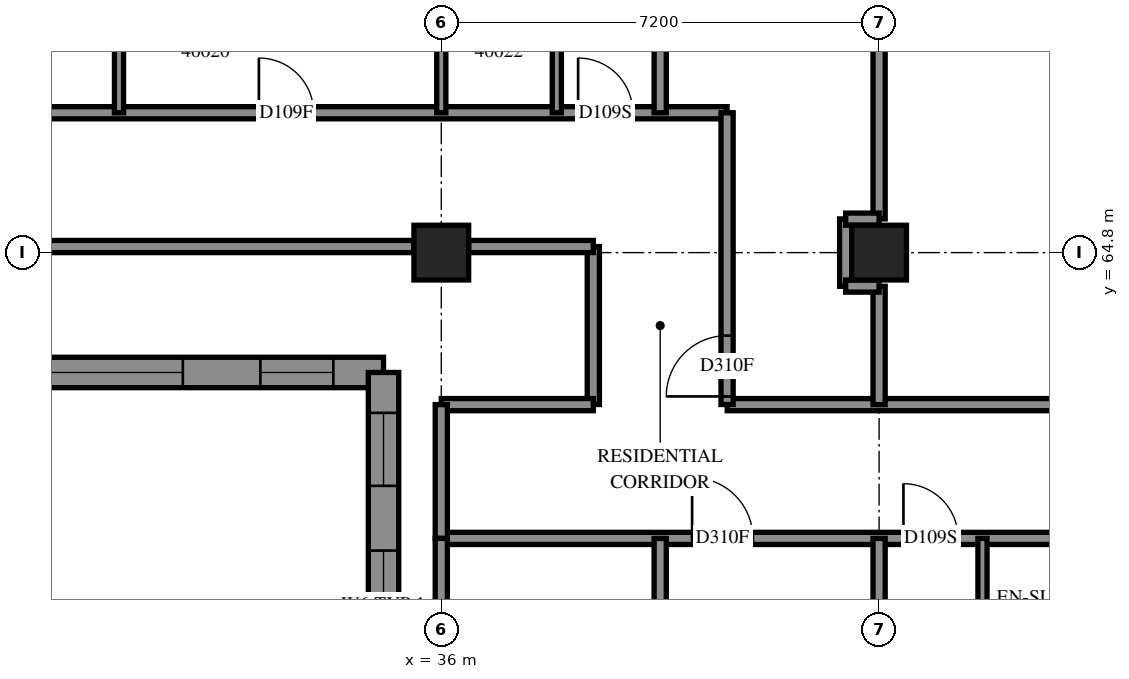
"""IFC4 building model, lengths in metres.
Left out: names, types, materials, properties, quantities, classifications, styles, units other than length and angle.
Written with IfcOpenShell. Run it as: python <this file> out.ifc"""

import sys

from ifc_helpers import new_model, si_unit, direction, frame, frame_2d, origin, origin_2d, place, context, subcontext, project, spatial, polyline, rectangle, outline, extrude, element, fill, save


model = new_model("IFC4")
c1 = context("Model", 3, precision=1e-05, world=origin(), true_north=direction((0.0, 1.0)))
c2 = subcontext(c1, "Body", "Model", "MODEL_VIEW")
j1 = project(units=[si_unit("LENGTHUNIT", "METRE"), si_unit("PLANEANGLEUNIT", "RADIAN")], contexts=[c1])
p1 = place(None, origin())
s1 = spatial("IfcSite", under=j1, at=p1, CompositionType="ELEMENT")
p2 = place(p1, origin())
s2 = spatial("IfcBuilding", under=s1, at=p2, CompositionType="ELEMENT")
p3 = place(p2, frame((0.0, 0.0, 149.0)))
s3 = spatial("IfcBuildingStorey", under=s2, at=p3, CompositionType="ELEMENT", Elevation=149.0)
for number, where, z_axis, x_axis in (
    (1, (36.0, 64.8, 0.0), (0.0, 0.0, 1.0), (1.0, 0.0, 0.0)),
    (2, (43.2, 64.8, 0.0), (0.0, 0.0, 1.0), (1.0, 0.0, 0.0)),
):
    element("IfcColumn", number, at=place(p3, frame(where, z_axis=z_axis, x_axis=x_axis)), inside=s3, PredefinedType="COLUMN", context=c2, shape_type="SweptSolid", body=[
        extrude(rectangle(XDim=0.9, YDim=0.9, at=origin_2d()), origin(), (0.0, 0.0, 1.0), 3.1),
    ])
p4 = place(p3, frame((19.629, 62.829, 0.0), z_axis=(0.0, 0.0, 1.0), x_axis=(1.0, 0.0, 0.0)))
e3 = element("IfcWall", 3, at=p4, inside=s3, PredefinedType="SOLIDWALL", context=c2, shape_type="SweptSolid", body=[
    extrude(outline(polyline([(-0.25, -0.25), (15.171, -0.25), (15.671, 0.25), (0.25, 0.25), (-0.25, -0.25)])), origin(), (0.0, 0.0, 1.0), 3.1),
])
p5 = place(p4, frame((2.371, 0.0, 0.45)))
e4 = element("IfcOpeningElement", 4, at=p5, cuts=e3, PredefinedType="OPENING", context=c2, shape_type="SweptSolid", body=[
    extrude(rectangle(XDim=2.8, YDim=2.5, at=frame_2d((1.4, 1.25))), frame((0.0, 0.26, 0.0), z_axis=(0.0, -1.0, 0.0), x_axis=(1.0, 0.0, 0.0)), (0.0, 0.0, 1.0), 0.52),
])
p6 = place(p4, frame((5.971, 0.0, 0.45)))
e5 = element("IfcOpeningElement", 5, at=p6, cuts=e3, PredefinedType="OPENING", context=c2, shape_type="SweptSolid", body=[
    extrude(rectangle(XDim=2.8, YDim=2.5, at=frame_2d((1.4, 1.25))), frame((0.0, 0.26, 0.0), z_axis=(0.0, -1.0, 0.0), x_axis=(1.0, 0.0, 0.0)), (0.0, 0.0, 1.0), 0.52),
])
p7 = place(p4, frame((9.321, 0.0, 0.45)))
e6 = element("IfcOpeningElement", 6, at=p7, cuts=e3, PredefinedType="OPENING", context=c2, shape_type="SweptSolid", body=[
    extrude(rectangle(XDim=2.8, YDim=2.5, at=frame_2d((1.4, 1.25))), frame((0.0, 0.26, 0.0), z_axis=(0.0, -1.0, 0.0), x_axis=(1.0, 0.0, 0.0)), (0.0, 0.0, 1.0), 0.52),
])
p8 = place(p4, frame((0.611, 0.0, 0.45)))
e7 = element("IfcOpeningElement", 7, at=p8, cuts=e3, PredefinedType="OPENING", context=c2, shape_type="SweptSolid", body=[
    extrude(rectangle(XDim=1.2, YDim=2.5, at=frame_2d((0.6, 1.25))), frame((0.0, 0.26, 0.0), z_axis=(0.0, -1.0, 0.0), x_axis=(1.0, 0.0, 0.0)), (0.0, 0.0, 1.0), 0.52),
])
p9 = place(p4, frame((13.396, 0.0, 0.45)))
e8 = element("IfcOpeningElement", 8, at=p9, cuts=e3, PredefinedType="OPENING", context=c2, shape_type="SweptSolid", body=[
    extrude(rectangle(XDim=1.2, YDim=2.5, at=frame_2d((0.6, 1.25))), frame((0.0, 0.26, 0.0), z_axis=(0.0, -1.0, 0.0), x_axis=(1.0, 0.0, 0.0)), (0.0, 0.0, 1.0), 0.52),
])
p10 = place(p3, frame((35.05, 62.829, 0.0), z_axis=(0.0, 0.0, 1.0), x_axis=(0.0, -1.0, 0.0)))
e9 = element("IfcWall", 9, at=p10, inside=s3, PredefinedType="SOLIDWALL", context=c2, shape_type="SweptSolid", body=[
    extrude(outline(polyline([(0.25, -0.25), (6.429, -0.25), (5.929, 0.25), (-0.25, 0.25), (0.25, -0.25)])), origin(), (0.0, 0.0, 1.0), 3.1),
])
p11 = place(p10, frame((0.664, 0.0, 0.45)))
e10 = element("IfcOpeningElement", 10, at=p11, cuts=e9, PredefinedType="OPENING", context=c2, shape_type="SweptSolid", body=[
    extrude(rectangle(XDim=1.2, YDim=2.5, at=frame_2d((0.6, 1.25))), frame((0.0, 0.26, 0.0), z_axis=(0.0, -1.0, 0.0), x_axis=(1.0, 0.0, 0.0)), (0.0, 0.0, 1.0), 0.52),
])
p12 = place(p10, frame((2.929, 0.0, 0.7)))
e11 = element("IfcOpeningElement", 11, at=p12, cuts=e9, PredefinedType="OPENING", context=c2, shape_type="SweptSolid", body=[
    extrude(rectangle(XDim=1.8, YDim=2.2, at=frame_2d((0.9, 1.1))), frame((0.0, 0.26, 0.0), z_axis=(0.0, -1.0, 0.0), x_axis=(1.0, 0.0, 0.0)), (0.0, 0.0, 1.0), 0.52),
])
p13 = place(p3, frame((21.602, 67.1, 0.0), z_axis=(0.0, 0.0, 1.0), x_axis=(1.0, 0.0, 0.0)))
e12 = element("IfcWall", 12, at=p13, inside=s3, PredefinedType="PARTITIONING", context=c2, shape_type="SweptSolid", body=[
    extrude(rectangle(XDim=19.098, YDim=0.2, at=frame_2d((9.549, 0.0))), origin(), (0.0, 0.0, 1.0), 3.1),
])
p14 = place(p13, frame((3.998, 0.0, 0.0)))
e13 = element("IfcOpeningElement", 13, at=p14, cuts=e12, PredefinedType="OPENING", context=c2, shape_type="SweptSolid", body=[
    extrude(rectangle(XDim=0.9, YDim=2.1, at=frame_2d((0.45, 1.05))), frame((0.0, 0.11, 0.0), z_axis=(0.0, -1.0, 0.0), x_axis=(1.0, 0.0, 0.0)), (0.0, 0.0, 1.0), 0.22),
])
p15 = place(p13, frame((11.399, 0.0, 0.0)))
e14 = element("IfcOpeningElement", 14, at=p15, cuts=e12, PredefinedType="OPENING", context=c2, shape_type="SweptSolid", body=[
    extrude(rectangle(XDim=0.9, YDim=2.1, at=frame_2d((0.45, 1.05))), frame((0.0, 0.11, 0.0), z_axis=(0.0, -1.0, 0.0), x_axis=(1.0, 0.0, 0.0)), (0.0, 0.0, 1.0), 0.22),
])
p16 = place(p13, frame((16.648, 0.0, 0.0)))
e15 = element("IfcOpeningElement", 15, at=p16, cuts=e12, PredefinedType="OPENING", context=c2, shape_type="SweptSolid", body=[
    extrude(rectangle(XDim=0.9, YDim=2.1, at=frame_2d((0.45, 1.05))), frame((0.0, 0.11, 0.0), z_axis=(0.0, -1.0, 0.0), x_axis=(1.0, 0.0, 0.0)), (0.0, 0.0, 1.0), 0.22),
])
p17 = place(p3, frame((36.0, 60.1, 0.0), z_axis=(0.0, 0.0, 1.0), x_axis=(1.0, 0.0, 0.0)))
e16 = element("IfcWall", 16, at=p17, inside=s3, PredefinedType="PARTITIONING", context=c2, shape_type="SweptSolid", body=[
    extrude(rectangle(XDim=16.9, YDim=0.2, at=frame_2d((8.45, 0.0))), origin(), (0.0, 0.0, 1.0), 3.1),
])
p18 = place(p17, frame((4.125, 0.0, 0.0)))
e17 = element("IfcOpeningElement", 17, at=p18, cuts=e16, PredefinedType="OPENING", context=c2, shape_type="SweptSolid", body=[
    extrude(rectangle(XDim=1.0, YDim=2.1, at=frame_2d((0.5, 1.05))), frame((0.0, 0.11, 0.0), z_axis=(0.0, -1.0, 0.0), x_axis=(1.0, 0.0, 0.0)), (0.0, 0.0, 1.0), 0.22),
])
p19 = place(p17, frame((7.6, 0.0, 0.0)))
e18 = element("IfcOpeningElement", 18, at=p19, cuts=e16, PredefinedType="OPENING", context=c2, shape_type="SweptSolid", body=[
    extrude(rectangle(XDim=0.9, YDim=2.1, at=frame_2d((0.45, 1.05))), frame((0.0, 0.11, 0.0), z_axis=(0.0, -1.0, 0.0), x_axis=(1.0, 0.0, 0.0)), (0.0, 0.0, 1.0), 0.22),
])
p20 = place(p17, frame((11.635, 0.0, 0.0)))
e19 = element("IfcOpeningElement", 19, at=p20, cuts=e16, PredefinedType="OPENING", context=c2, shape_type="SweptSolid", body=[
    extrude(rectangle(XDim=1.0, YDim=2.1, at=frame_2d((0.5, 1.05))), frame((0.0, 0.11, 0.0), z_axis=(0.0, -1.0, 0.0), x_axis=(1.0, 0.0, 0.0)), (0.0, 0.0, 1.0), 0.22),
])
p21 = place(p17, frame((15.652, 0.0, 0.0)))
e20 = element("IfcOpeningElement", 20, at=p21, cuts=e16, PredefinedType="OPENING", context=c2, shape_type="SweptSolid", body=[
    extrude(rectangle(XDim=1.0, YDim=2.1, at=frame_2d((0.5, 1.05))), frame((0.0, 0.11, 0.0), z_axis=(0.0, -1.0, 0.0), x_axis=(1.0, 0.0, 0.0)), (0.0, 0.0, 1.0), 0.22),
])
p22 = place(p3, frame((40.702, 62.3, 0.0), z_axis=(0.0, 0.0, 1.0), x_axis=(1.0, 0.0, 0.0)))
e21 = element("IfcWall", 21, at=p22, inside=s3, PredefinedType="PARTITIONING", context=c2, shape_type="SweptSolid", body=[
    extrude(rectangle(XDim=9.698, YDim=0.2, at=frame_2d((4.849, 0.0))), origin(), (0.0, 0.0, 1.0), 3.1),
])
p23 = place(p22, frame((6.198, 0.0, 0.0)))
e22 = element("IfcOpeningElement", 22, at=p23, cuts=e21, PredefinedType="OPENING", context=c2, shape_type="SweptSolid", body=[
    extrude(rectangle(XDim=1.0, YDim=2.1, at=frame_2d((0.5, 1.05))), frame((0.0, 0.11, 0.0), z_axis=(0.0, -1.0, 0.0), x_axis=(1.0, 0.0, 0.0)), (0.0, 0.0, 1.0), 0.22),
])
p24 = place(p3, frame((29.25, 64.9, 0.0), z_axis=(0.0, 0.0, 1.0), x_axis=(1.0, 0.0, 0.0)))
e23 = element("IfcWall", 23, at=p24, inside=s3, PredefinedType="PARTITIONING", context=c2, shape_type="SweptSolid", body=[
    extrude(rectangle(XDim=6.3, YDim=0.2, at=frame_2d((3.15, 0.0))), origin(), (0.0, 0.0, 1.0), 2.6),
])
p25 = place(p3, frame((43.2, 65.354, 0.0), z_axis=(0.0, 0.0, 1.0), x_axis=(0.0, 1.0, 0.0)))
e24 = element("IfcWall", 24, at=p25, inside=s3, PredefinedType="PARTITIONING", context=c2, shape_type="SweptSolid", body=[
    extrude(rectangle(XDim=6.092, YDim=0.2, at=frame_2d((3.046, 0.0))), origin(), (0.0, 0.0, 1.0), 3.1),
])
p26 = place(p3, frame((39.6, 67.1, 0.0), z_axis=(0.0, 0.0, 1.0), x_axis=(0.0, 1.0, 0.0)))
e25 = element("IfcWall", 25, at=p26, inside=s3, PredefinedType="PARTITIONING", context=c2, shape_type="SweptSolid", body=[
    extrude(rectangle(XDim=5.734, YDim=0.2, at=frame_2d((2.867, 0.0))), origin(), (0.0, 0.0, 1.0), 3.1),
])
p27 = place(p3, frame((40.7, 62.302, 0.0), z_axis=(0.0, 0.0, 1.0), x_axis=(0.0, 1.0, 0.0)))
e26 = element("IfcWall", 26, at=p27, inside=s3, PredefinedType="PARTITIONING", context=c2, shape_type="SweptSolid", body=[
    extrude(rectangle(XDim=4.798, YDim=0.2, at=frame_2d((2.399, 0.0))), origin(), (0.0, 0.0, 1.0), 3.1),
])
p28 = place(p27, frame((0.133, 0.0, 0.0)))
e27 = element("IfcOpeningElement", 27, at=p28, cuts=e26, PredefinedType="OPENING", context=c2, shape_type="SweptSolid", body=[
    extrude(rectangle(XDim=1.0, YDim=2.1, at=frame_2d((0.5, 1.05))), frame((0.0, 0.11, 0.0), z_axis=(0.0, -1.0, 0.0), x_axis=(1.0, 0.0, 0.0)), (0.0, 0.0, 1.0), 0.22),
])
p29 = place(p3, frame((39.6, 56.9, 0.0), z_axis=(0.0, 0.0, 1.0), x_axis=(0.0, 1.0, 0.0)))
e28 = element("IfcWall", 28, at=p29, inside=s3, PredefinedType="PARTITIONING", context=c2, shape_type="SweptSolid", body=[
    extrude(rectangle(XDim=3.2, YDim=0.2, at=frame_2d((1.6, 0.0))), origin(), (0.0, 0.0, 1.0), 3.1),
])
p30 = place(p3, frame((38.5, 62.302, 0.0), z_axis=(0.0, 0.0, 1.0), x_axis=(0.0, 1.0, 0.0)))
e29 = element("IfcWall", 29, at=p30, inside=s3, PredefinedType="PARTITIONING", context=c2, shape_type="SweptSolid", body=[
    extrude(rectangle(XDim=2.598, YDim=0.2, at=frame_2d((1.299, 0.0))), origin(), (0.0, 0.0, 1.0), 3.1),
])
p31 = place(p3, frame((36.0, 62.3, 0.0), z_axis=(0.0, 0.0, 1.0), x_axis=(1.0, 0.0, 0.0)))
e30 = element("IfcWall", 30, at=p31, inside=s3, PredefinedType="PARTITIONING", context=c2, shape_type="SweptSolid", body=[
    extrude(rectangle(XDim=2.5, YDim=0.2, at=frame_2d((1.25, 0.0))), origin(), (0.0, 0.0, 1.0), 3.1),
])
for number, where, z_axis, x_axis in (
    (31, (30.7, 67.1, 0.0), (0.0, 0.0, 1.0), (0.0, 1.0, 0.0)),
    (32, (36.0, 67.1, 0.0), (0.0, 0.0, 1.0), (0.0, 1.0, 0.0)),
    (33, (37.9, 67.1, 0.0), (0.0, 0.0, 1.0), (0.0, 1.0, 0.0)),
    (34, (44.9, 57.7, 0.0), (0.0, 0.0, 1.0), (0.0, 1.0, 0.0)),
):
    element("IfcWall", number, at=place(p3, frame(where, z_axis=z_axis, x_axis=x_axis)), inside=s3, PredefinedType="PARTITIONING", context=c2, shape_type="SweptSolid", body=[
        extrude(rectangle(XDim=2.4, YDim=0.15, at=frame_2d((1.2, 0.0))), origin(), (0.0, 0.0, 1.0), 3.1),
    ])
p32 = place(p3, frame((36.0, 60.1, 0.0), z_axis=(0.0, 0.0, 1.0), x_axis=(0.0, 1.0, 0.0)))
e35 = element("IfcWall", 35, at=p32, inside=s3, PredefinedType="PARTITIONING", context=c2, shape_type="SweptSolid", body=[
    extrude(rectangle(XDim=2.2, YDim=0.2, at=frame_2d((1.1, 0.0))), origin(), (0.0, 0.0, 1.0), 2.6),
])
p33 = place(p3, frame((36.0, 58.05, 0.0), z_axis=(0.0, 0.0, 1.0), x_axis=(0.0, 1.0, 0.0)))
e36 = element("IfcWall", 36, at=p33, inside=s3, PredefinedType="PARTITIONING", context=c2, shape_type="SweptSolid", body=[
    extrude(rectangle(XDim=2.05, YDim=0.2, at=frame_2d((1.025, 0.0))), origin(), (0.0, 0.0, 1.0), 2.6),
])
for number, where, z_axis, x_axis in (
    (37, (43.2, 58.05, 0.0), (0.0, 0.0, 1.0), (0.0, 1.0, 0.0)),
    (38, (36.45, 64.9, 0.0), (0.0, 0.0, 1.0), (1.0, 0.0, 0.0)),
):
    element("IfcWall", number, at=place(p3, frame(where, z_axis=z_axis, x_axis=x_axis)), inside=s3, PredefinedType="PARTITIONING", context=c2, shape_type="SweptSolid", body=[
        extrude(rectangle(XDim=2.05, YDim=0.2, at=frame_2d((1.025, 0.0))), origin(), (0.0, 0.0, 1.0), 3.1),
    ])
p34 = place(p3, frame((43.2, 62.3, 0.0), z_axis=(0.0, 0.0, 1.0), x_axis=(0.0, 1.0, 0.0)))
e39 = element("IfcWall", 39, at=p34, inside=s3, PredefinedType="PARTITIONING", context=c2, shape_type="SweptSolid", body=[
    extrude(rectangle(XDim=1.946, YDim=0.2, at=frame_2d((0.973, 0.0))), origin(), (0.0, 0.0, 1.0), 3.1),
])
p35 = place(p3, frame((42.65, 64.246, 0.0), z_axis=(0.0, 0.0, 1.0), x_axis=(0.0, 1.0, 0.0)))
e40 = element("IfcWall", 40, at=p35, inside=s3, PredefinedType="PARTITIONING", context=c2, shape_type="SweptSolid", body=[
    extrude(rectangle(XDim=1.108, YDim=0.2, at=frame_2d((0.554, 0.0))), origin(), (0.0, 0.0, 1.0), 3.1),
])
for number, where, z_axis, x_axis in (
    (41, (42.65, 65.35, 0.0), (0.0, 0.0, 1.0), (1.0, 0.0, 0.0)),
    (42, (42.65, 64.25, 0.0), (0.0, 0.0, 1.0), (1.0, 0.0, 0.0)),
):
    element("IfcWall", number, at=place(p3, frame(where, z_axis=z_axis, x_axis=x_axis)), inside=s3, PredefinedType="PARTITIONING", context=c2, shape_type="SweptSolid", body=[
        extrude(rectangle(XDim=0.55, YDim=0.2, at=frame_2d((0.275, 0.0))), origin(), (0.0, 0.0, 1.0), 3.1),
    ])
p36 = place(p7, origin())
e43 = element("IfcWindow", 43, at=p36, inside=s3, PartitioningType="SINGLE_PANEL", PredefinedType="WINDOW", context=c2, shape_type="SweptSolid", body=[
    extrude(rectangle(XDim=2.8, YDim=2.5, at=frame_2d((1.4, 1.25))), frame((0.0, 0.18, 0.0), z_axis=(0.0, -1.0, 0.0), x_axis=(1.0, 0.0, 0.0)), (0.0, 0.0, 1.0), 0.06),
])
fill(e6, e43)
p37 = place(p9, origin())
e44 = element("IfcWindow", 44, at=p37, inside=s3, PartitioningType="SINGLE_PANEL", PredefinedType="WINDOW", context=c2, shape_type="SweptSolid", body=[
    extrude(rectangle(XDim=1.2, YDim=2.5, at=frame_2d((0.6, 1.25))), frame((0.0, 0.18, 0.0), z_axis=(0.0, -1.0, 0.0), x_axis=(1.0, 0.0, 0.0)), (0.0, 0.0, 1.0), 0.06),
])
fill(e8, e44)
p38 = place(p11, origin())
e45 = element("IfcWindow", 45, at=p38, inside=s3, PartitioningType="SINGLE_PANEL", PredefinedType="WINDOW", context=c2, shape_type="SweptSolid", body=[
    extrude(rectangle(XDim=1.2, YDim=2.5, at=frame_2d((0.6, 1.25))), frame((0.0, 0.18, 0.0), z_axis=(0.0, -1.0, 0.0), x_axis=(1.0, 0.0, 0.0)), (0.0, 0.0, 1.0), 0.06),
])
fill(e10, e45)
p39 = place(p15, origin())
e46 = element("IfcDoor", 46, at=p39, inside=s3, OperationType="SINGLE_SWING_RIGHT", PredefinedType="DOOR", context=c2, shape_type="SweptSolid", body=[
    extrude(rectangle(XDim=0.9, YDim=2.1, at=frame_2d((0.45, 1.05))), frame((0.0, 0.025, 0.0), z_axis=(0.0, -1.0, 0.0), x_axis=(1.0, 0.0, 0.0)), (0.0, 0.0, 1.0), 0.05),
])
fill(e14, e46)
p40 = place(p16, origin())
e47 = element("IfcDoor", 47, at=p40, inside=s3, OperationType="SINGLE_SWING_RIGHT", PredefinedType="DOOR", context=c2, shape_type="SweptSolid", body=[
    extrude(rectangle(XDim=0.9, YDim=2.1, at=frame_2d((0.45, 1.05))), frame((0.0, 0.025, 0.0), z_axis=(0.0, -1.0, 0.0), x_axis=(1.0, 0.0, 0.0)), (0.0, 0.0, 1.0), 0.05),
])
fill(e15, e47)
p41 = place(p18, origin())
e48 = element("IfcDoor", 48, at=p41, inside=s3, OperationType="SINGLE_SWING_RIGHT", PredefinedType="DOOR", context=c2, shape_type="SweptSolid", body=[
    extrude(rectangle(XDim=1.0, YDim=2.1, at=frame_2d((0.5, 1.05))), frame((0.0, 0.025, 0.0), z_axis=(0.0, -1.0, 0.0), x_axis=(1.0, 0.0, 0.0)), (0.0, 0.0, 1.0), 0.05),
])
fill(e17, e48)
p42 = place(p19, origin())
e49 = element("IfcDoor", 49, at=p42, inside=s3, OperationType="SINGLE_SWING_LEFT", PredefinedType="DOOR", context=c2, shape_type="SweptSolid", body=[
    extrude(rectangle(XDim=0.9, YDim=2.1, at=frame_2d((0.45, 1.05))), frame((0.0, 0.025, 0.0), z_axis=(0.0, -1.0, 0.0), x_axis=(1.0, 0.0, 0.0)), (0.0, 0.0, 1.0), 0.05),
])
fill(e18, e49)
p43 = place(p28, origin())
e50 = element("IfcDoor", 50, at=p43, inside=s3, OperationType="SINGLE_SWING_LEFT", PredefinedType="DOOR", context=c2, shape_type="SweptSolid", body=[
    extrude(rectangle(XDim=1.0, YDim=2.1, at=frame_2d((0.5, 1.05))), frame((0.0, 0.025, 0.0), z_axis=(0.0, -1.0, 0.0), x_axis=(1.0, 0.0, 0.0)), (0.0, 0.0, 1.0), 0.05),
])
fill(e27, e50)
p44 = place(p12, origin())
e51 = element("IfcWindow", 51, at=p44, inside=s3, PartitioningType="SINGLE_PANEL", PredefinedType="WINDOW", context=c2, shape_type="SweptSolid", body=[
    extrude(rectangle(XDim=1.8, YDim=2.2, at=frame_2d((0.9, 1.1))), frame((0.0, 0.18, 0.0), z_axis=(0.0, -1.0, 0.0), x_axis=(1.0, 0.0, 0.0)), (0.0, 0.0, 1.0), 0.06),
])
fill(e11, e51)
save(model, sys.argv[1])
